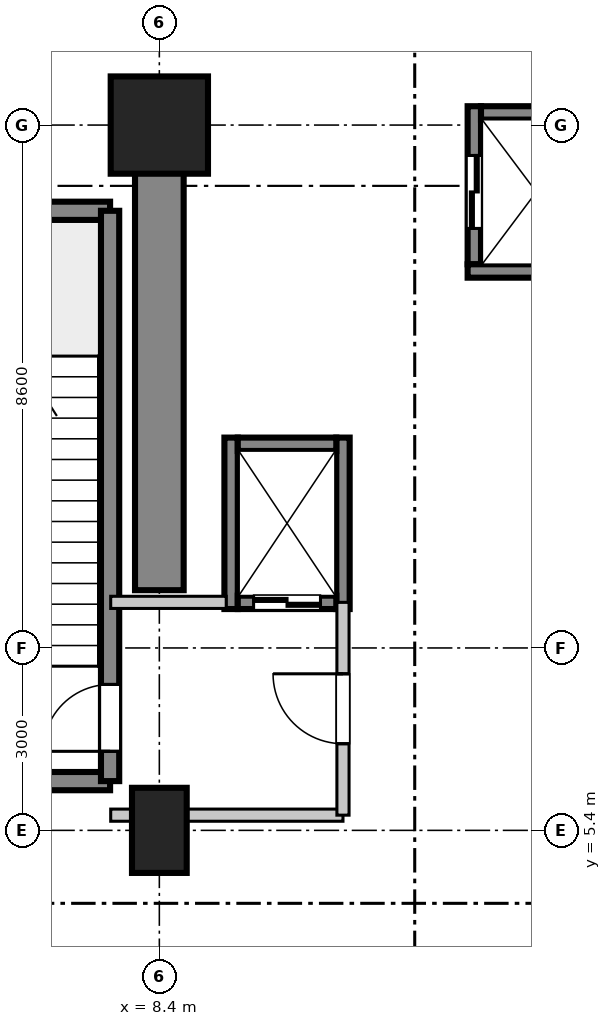
"""IFC4 building model, lengths in metres.
Left out: names, types, materials, properties, quantities, classifications, styles, units other than length and angle.
Written with IfcOpenShell. Run it as: python <this file> out.ifc"""

import sys

from ifc_helpers import new_model, si_unit, direction, frame, frame_2d, origin, origin_2d, place, context, subcontext, project, spatial, rectangle, extrude, source, transform, mapped, element, fill, save


model = new_model("IFC4")
c1 = context("Model", 3, precision=1e-05, world=origin(), true_north=direction((0.0, 1.0)))
c2 = subcontext(c1, "Body", "Model", "MODEL_VIEW")
j1 = project(units=[si_unit("LENGTHUNIT", "METRE"), si_unit("PLANEANGLEUNIT", "RADIAN")], contexts=[c1])
p1 = place(None, origin())
s1 = spatial("IfcSite", under=j1, at=p1, CompositionType="ELEMENT")
p2 = place(p1, origin())
s2 = spatial("IfcBuilding", under=s1, at=p2, CompositionType="ELEMENT")
p3 = place(p2, frame((0.0, 0.0, -10.8)))
s3 = spatial("IfcBuildingStorey", under=s2, at=p3, CompositionType="ELEMENT", Elevation=-10.8)
m1 = source(origin(), c2, "Body", "SweptSolid", [
    extrude(rectangle(XDim=0.9, YDim=1.4, at=origin_2d()), origin(), (0.0, 0.0, 1.0), 5.355),
])
p4 = place(p3, frame((8.4, 5.4, 0.0), z_axis=(0.0, 0.0, 1.0), x_axis=(1.0, 0.0, 0.0)))
e1 = element("IfcColumn", 1, at=p4, inside=s3, PredefinedType="PILASTER", context=c2, shape_type="MappedRepresentation", body=[
    mapped(m1, transform((0.0, 0.0, 0.0), scale=1.0)),
])
m2 = source(origin(), c2, "Body", "SweptSolid", [
    extrude(rectangle(XDim=1.6, YDim=1.6, at=origin_2d()), origin(), (0.0, 0.0, 1.0), 5.355),
])
p5 = place(p3, frame((8.4, 17.0, 0.0), z_axis=(0.0, 0.0, 1.0), x_axis=(1.0, 0.0, 0.0)))
e2 = element("IfcColumn", 2, at=p5, inside=s3, PredefinedType="COLUMN", context=c2, shape_type="MappedRepresentation", body=[
    mapped(m2, transform((0.0, 0.0, 0.0), scale=1.0)),
])
m3 = source(origin(), c2, "Body", "SweptSolid", [
    extrude(rectangle(XDim=7.65, YDim=0.8, at=frame_2d((3.825, 0.0))), origin(), (0.0, 0.0, 1.0), 5.05),
])
p6 = place(p3, frame((8.4, 9.35, 0.0), z_axis=(0.0, 0.0, 1.0), x_axis=(0.0, 1.0, 0.0)))
e3 = element("IfcWall", 3, at=p6, inside=s3, PredefinedType="SHEAR", context=c2, shape_type="MappedRepresentation", body=[
    mapped(m3, transform((0.0, 0.0, 0.0), scale=1.0)),
])
m4 = source(origin(), c2, "Body", "SweptSolid", [
    extrude(rectangle(XDim=3.98, YDim=0.3, at=frame_2d((1.99, 0.0))), origin(), (0.0, 0.0, 1.0), 5.05),
])
for number, where, z_axis, x_axis in (
    (4, (3.61, 6.21, 0.0), (0.0, 0.0, 1.0), (1.0, 0.0, 0.0)),
    (5, (3.61, 15.59, 0.0), (0.0, 0.0, 1.0), (1.0, 0.0, 0.0)),
):
    element("IfcWall", number, at=place(p3, frame(where, z_axis=z_axis, x_axis=x_axis)), inside=s3, PredefinedType="SHEAR", context=c2, shape_type="MappedRepresentation", body=[
        mapped(m4, transform((0.0, 0.0, 0.0), scale=1.0)),
    ])
m5 = source(origin(), c2, "Body", "SweptSolid", [
    extrude(rectangle(XDim=9.38, YDim=0.3, at=frame_2d((4.69, 0.0))), origin(), (0.0, 0.0, 1.0), 5.05),
])
p7 = place(p3, frame((7.59, 6.21, 0.0), z_axis=(0.0, 0.0, 1.0), x_axis=(0.0, 1.0, 0.0)))
e6 = element("IfcWall", 6, at=p7, inside=s3, PredefinedType="SHEAR", context=c2, shape_type="MappedRepresentation", body=[
    mapped(m5, transform((0.0, 0.0, 0.0), scale=1.0)),
])
p8 = place(p7, frame((0.49, 0.0, 0.0)))
e7 = element("IfcOpeningElement", 7, at=p8, cuts=e6, PredefinedType="OPENING", context=c2, shape_type="SweptSolid", body=[
    extrude(rectangle(XDim=1.1, YDim=2.15, at=frame_2d((0.55, 1.075))), frame((0.0, 0.16, 0.0), z_axis=(0.0, -1.0, 0.0), x_axis=(1.0, 0.0, 0.0)), (0.0, 0.0, 1.0), 0.32),
])
m6 = source(origin(), c2, "Body", "SweptSolid", [
    extrude(rectangle(XDim=2.82, YDim=0.22, at=frame_2d((1.41, 0.0))), origin(), (0.0, 0.0, 1.0), 5.05),
])
for number, where, z_axis, x_axis in (
    (8, (9.58, 9.04, 0.0), (0.0, 0.0, 1.0), (0.0, 1.0, 0.0)),
    (9, (11.42, 9.04, 0.0), (0.0, 0.0, 1.0), (0.0, 1.0, 0.0)),
):
    element("IfcWall", number, at=place(p3, frame(where, z_axis=z_axis, x_axis=x_axis)), inside=s3, PredefinedType="SHEAR", context=c2, shape_type="MappedRepresentation", body=[
        mapped(m6, transform((0.0, 0.0, 0.0), scale=1.0)),
    ])
m7 = source(origin(), c2, "Body", "SweptSolid", [
    extrude(rectangle(XDim=1.62, YDim=0.22, at=frame_2d((0.81, 0.0))), origin(), (0.0, 0.0, 1.0), 5.05),
])
p9 = place(p3, frame((9.69, 9.15, 0.0), z_axis=(0.0, 0.0, 1.0), x_axis=(1.0, 0.0, 0.0)))
e10 = element("IfcWall", 10, at=p9, inside=s3, PredefinedType="SHEAR", context=c2, shape_type="MappedRepresentation", body=[
    mapped(m7, transform((0.0, 0.0, 0.0), scale=1.0)),
])
p10 = place(p9, frame((0.26, 0.0, 0.0)))
e11 = element("IfcOpeningElement", 11, at=p10, cuts=e10, PredefinedType="OPENING", context=c2, shape_type="SweptSolid", body=[
    extrude(rectangle(XDim=1.1, YDim=2.2, at=frame_2d((0.55, 1.1))), frame((0.0, 0.12, 0.0), z_axis=(0.0, -1.0, 0.0), x_axis=(1.0, 0.0, 0.0)), (0.0, 0.0, 1.0), 0.24),
])
p11 = place(p3, frame((9.69, 11.75, 0.0), z_axis=(0.0, 0.0, 1.0), x_axis=(1.0, 0.0, 0.0)))
e12 = element("IfcWall", 12, at=p11, inside=s3, PredefinedType="SHEAR", context=c2, shape_type="MappedRepresentation", body=[
    mapped(m7, transform((0.0, 0.0, 0.0), scale=1.0)),
])
m8 = source(origin(), c2, "Body", "SweptSolid", [
    extrude(rectangle(XDim=2.6, YDim=0.22, at=frame_2d((1.3, 0.0))), origin(), (0.0, 0.0, 1.0), 5.05),
])
p12 = place(p3, frame((13.58, 14.71, 0.0), z_axis=(0.0, 0.0, 1.0), x_axis=(0.0, 1.0, 0.0)))
e13 = element("IfcWall", 13, at=p12, inside=s3, PredefinedType="SHEAR", context=c2, shape_type="MappedRepresentation", body=[
    mapped(m8, transform((0.0, 0.0, 0.0), scale=1.0)),
])
p13 = place(p12, frame((0.59, 0.0, 0.0)))
e14 = element("IfcOpeningElement", 14, at=p13, cuts=e13, PredefinedType="OPENING", context=c2, shape_type="SweptSolid", body=[
    extrude(rectangle(XDim=1.2, YDim=2.2, at=frame_2d((0.6, 1.1))), frame((0.0, 0.12, 0.0), z_axis=(0.0, -1.0, 0.0), x_axis=(1.0, 0.0, 0.0)), (0.0, 0.0, 1.0), 0.24),
])
m9 = source(origin(), c2, "Body", "SweptSolid", [
    extrude(rectangle(XDim=2.18, YDim=0.22, at=frame_2d((1.09, 0.0))), origin(), (0.0, 0.0, 1.0), 5.05),
])
p14 = place(p3, frame((13.47, 14.6, 0.0), z_axis=(0.0, 0.0, 1.0), x_axis=(1.0, 0.0, 0.0)))
e15 = element("IfcWall", 15, at=p14, inside=s3, PredefinedType="SHEAR", context=c2, shape_type="MappedRepresentation", body=[
    mapped(m9, transform((0.0, 0.0, 0.0), scale=1.0)),
])
m10 = source(origin(), c2, "Body", "SweptSolid", [
    extrude(rectangle(XDim=1.82, YDim=0.22, at=frame_2d((0.91, 0.0))), origin(), (0.0, 0.0, 1.0), 5.05),
])
p15 = place(p3, frame((13.69, 17.2, 0.0), z_axis=(0.0, 0.0, 1.0), x_axis=(1.0, 0.0, 0.0)))
e16 = element("IfcWall", 16, at=p15, inside=s3, PredefinedType="SHEAR", context=c2, shape_type="MappedRepresentation", body=[
    mapped(m10, transform((0.0, 0.0, 0.0), scale=1.0)),
])
m11 = source(origin(), c2, "Body", "SweptSolid", [
    extrude(rectangle(XDim=3.82, YDim=0.2, at=frame_2d((1.91, 0.0))), origin(), (0.0, 0.0, 1.0), 3.4),
])
p16 = place(p3, frame((7.6, 5.65, 0.0), z_axis=(0.0, 0.0, 1.0), x_axis=(1.0, 0.0, 0.0)))
e17 = element("IfcWall", 17, at=p16, inside=s3, PredefinedType="PARTITIONING", context=c2, shape_type="MappedRepresentation", body=[
    mapped(m11, transform((0.0, 0.0, 0.0), scale=1.0)),
])
m12 = source(origin(), c2, "Body", "SweptSolid", [
    extrude(rectangle(XDim=1.9, YDim=0.2, at=frame_2d((0.95, 0.0))), origin(), (0.0, 0.0, 1.0), 3.4),
])
p17 = place(p3, frame((7.6, 9.15, 0.0), z_axis=(0.0, 0.0, 1.0), x_axis=(1.0, 0.0, 0.0)))
e18 = element("IfcWall", 18, at=p17, inside=s3, PredefinedType="PARTITIONING", context=c2, shape_type="MappedRepresentation", body=[
    mapped(m12, transform((0.0, 0.0, 0.0), scale=1.0)),
])
m13 = source(origin(), c2, "Body", "SweptSolid", [
    extrude(rectangle(XDim=3.5, YDim=0.2, at=frame_2d((1.75, 0.0))), origin(), (0.0, 0.0, 1.0), 3.4),
])
p18 = place(p3, frame((11.42, 5.65, 0.0), z_axis=(0.0, 0.0, 1.0), x_axis=(0.0, 1.0, 0.0)))
e19 = element("IfcWall", 19, at=p18, inside=s3, PredefinedType="PARTITIONING", context=c2, shape_type="MappedRepresentation", body=[
    mapped(m13, transform((0.0, 0.0, 0.0), scale=1.0)),
])
p19 = place(p18, frame((1.175, 0.0, 0.0)))
e20 = element("IfcOpeningElement", 20, at=p19, cuts=e19, PredefinedType="OPENING", context=c2, shape_type="SweptSolid", body=[
    extrude(rectangle(XDim=1.15, YDim=2.15, at=frame_2d((0.575, 1.075))), frame((0.0, 0.11, 0.0), z_axis=(0.0, -1.0, 0.0), x_axis=(1.0, 0.0, 0.0)), (0.0, 0.0, 1.0), 0.22),
])
m14 = source(origin(), c2, "Body", "SweptSolid", [
    extrude(rectangle(XDim=1.1, YDim=2.15, at=frame_2d((0.55, 1.075))), frame((0.0, 0.025, 0.0), z_axis=(0.0, -1.0, 0.0), x_axis=(1.0, 0.0, 0.0)), (0.0, 0.0, 1.0), 0.05),
])
p20 = place(p8, origin())
e21 = element("IfcDoor", 21, at=p20, inside=s3, OperationType="SINGLE_SWING_LEFT", PredefinedType="DOOR", context=c2, shape_type="MappedRepresentation", body=[
    mapped(m14, transform((0.0, 0.0, 0.0), scale=1.0)),
])
fill(e7, e21)
m15 = source(origin(), c2, "Body", "SweptSolid", [
    extrude(rectangle(XDim=1.1, YDim=2.2, at=frame_2d((0.55, 1.1))), frame((0.0, 0.025, 0.0), z_axis=(0.0, -1.0, 0.0), x_axis=(1.0, 0.0, 0.0)), (0.0, 0.0, 1.0), 0.05),
])
p21 = place(p10, frame((1.1, 0.0, 0.0), z_axis=(0.0, 0.0, 1.0), x_axis=(-1.0, 0.0, 0.0)))
e22 = element("IfcDoor", 22, at=p21, inside=s3, OperationType="DOUBLE_DOOR_SLIDING", PredefinedType="DOOR", context=c2, shape_type="MappedRepresentation", body=[
    mapped(m15, transform((0.0, 0.0, 0.0), scale=1.0)),
])
fill(e11, e22)
m16 = source(origin(), c2, "Body", "SweptSolid", [
    extrude(rectangle(XDim=1.2, YDim=2.2, at=frame_2d((0.6, 1.1))), frame((0.0, 0.025, 0.0), z_axis=(0.0, -1.0, 0.0), x_axis=(1.0, 0.0, 0.0)), (0.0, 0.0, 1.0), 0.05),
])
p22 = place(p13, origin())
e23 = element("IfcDoor", 23, at=p22, inside=s3, OperationType="DOUBLE_DOOR_SLIDING", PredefinedType="DOOR", context=c2, shape_type="MappedRepresentation", body=[
    mapped(m16, transform((0.0, 0.0, 0.0), scale=1.0)),
])
fill(e14, e23)
m17 = source(origin(), c2, "Body", "SweptSolid", [
    extrude(rectangle(XDim=1.15, YDim=2.15, at=frame_2d((0.575, 1.075))), frame((0.0, 0.025, 0.0), z_axis=(0.0, -1.0, 0.0), x_axis=(1.0, 0.0, 0.0)), (0.0, 0.0, 1.0), 0.05),
])
p23 = place(p19, frame((1.15, 0.0, 0.0), z_axis=(0.0, 0.0, 1.0), x_axis=(-1.0, 0.0, 0.0)))
e24 = element("IfcDoor", 24, at=p23, inside=s3, OperationType="SINGLE_SWING_RIGHT", PredefinedType="DOOR", context=c2, shape_type="MappedRepresentation", body=[
    mapped(m17, transform((0.0, 0.0, 0.0), scale=1.0)),
])
fill(e20, e24)
save(model, sys.argv[1])
